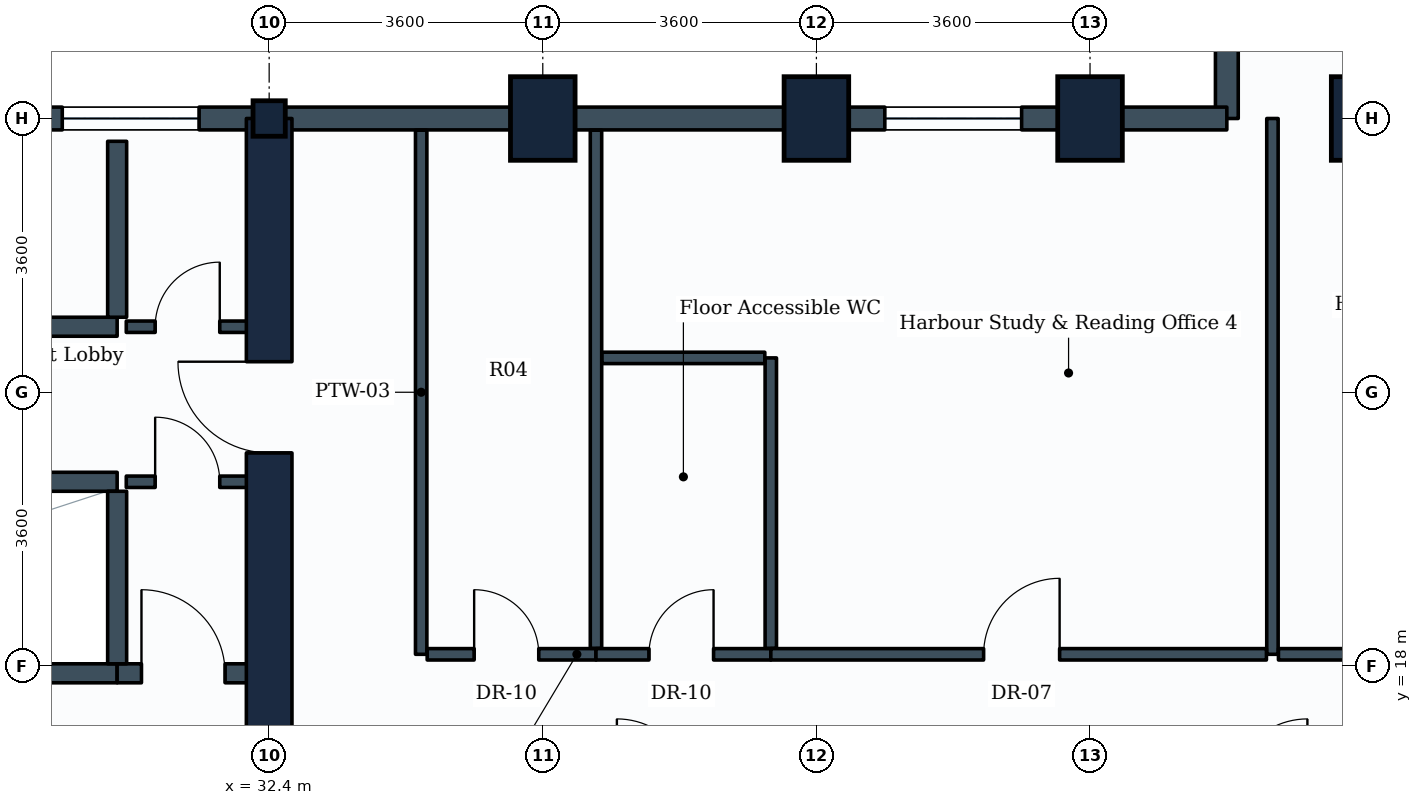
"""IFC4 building model, lengths in metres.
Left out: names, types, materials, properties, quantities, classifications, styles, units other than length and angle.
Written with IfcOpenShell. Run it as: python <this file> out.ifc"""

import sys

from ifc_helpers import new_model, si_unit, direction, frame, frame_2d, origin, origin_2d, place, context, subcontext, project, spatial, rectangle, i_section, extrude, element, fill, save


model = new_model("IFC4")
c1 = context("Model", 3, precision=1e-05, world=origin(), true_north=direction((0.0, 1.0)))
c2 = subcontext(c1, "Body", "Model", "MODEL_VIEW")
j1 = project(units=[si_unit("LENGTHUNIT", "METRE"), si_unit("PLANEANGLEUNIT", "RADIAN")], contexts=[c1])
p1 = place(None, origin())
s1 = spatial("IfcSite", under=j1, at=p1, CompositionType="ELEMENT")
p2 = place(p1, origin())
s2 = spatial("IfcBuilding", under=s1, at=p2, CompositionType="ELEMENT")
p3 = place(p2, frame((0.0, 0.0, 80.1)))
s3 = spatial("IfcBuildingStorey", under=s2, at=p3, CompositionType="ELEMENT", Elevation=80.1)
p4 = place(p3, frame((32.4, 25.2, 0.0), z_axis=(0.0, 0.0, 1.0), x_axis=(1.0, 0.0, 0.0)))
e1 = element("IfcColumn", 1, at=p4, inside=s3, PredefinedType="COLUMN", context=c2, shape_type="SweptSolid", body=[
    extrude(i_section(OverallWidth=0.424, OverallDepth=0.467, WebThickness=0.033, FlangeThickness=0.053, FilletRadius=0.015, at=origin_2d()), origin(), (0.0, 0.0, 1.0), 3.9),
])
for number, where, z_axis, x_axis in (
    (2, (36.0, 25.2, 0.0), (0.0, 0.0, 1.0), (1.0, 0.0, 0.0)),
    (3, (39.6, 25.2, 0.0), (0.0, 0.0, 1.0), (1.0, 0.0, 0.0)),
    (4, (43.2, 25.2, 0.0), (0.0, 0.0, 1.0), (1.0, 0.0, 0.0)),
    (5, (46.8, 25.2, 0.0), (0.0, 0.0, 1.0), (1.0, 0.0, 0.0)),
):
    element("IfcColumn", number, at=place(p3, frame(where, z_axis=z_axis, x_axis=x_axis)), inside=s3, PredefinedType="COLUMN", context=c2, shape_type="SweptSolid", body=[
        extrude(rectangle(XDim=0.85, YDim=1.1, at=origin_2d()), origin(), (0.0, 0.0, 1.0), 3.9),
    ])
p5 = place(p3, frame((45.0, 27.3, 0.0), z_axis=(0.0, 0.0, 1.0), x_axis=(0.0, -1.0, 0.0)))
e6 = element("IfcWall", 6, at=p5, inside=s3, PredefinedType="STANDARD", context=c2, shape_type="SweptSolid", body=[
    extrude(rectangle(XDim=2.1, YDim=0.3, at=frame_2d((1.05, 0.0))), origin(), (0.0, 0.0, 1.0), 2.93),
])
p6 = place(p3, frame((43.2, 25.2, 0.0), z_axis=(0.0, 0.0, 1.0), x_axis=(1.0, 0.0, 0.0)))
e7 = element("IfcWall", 7, at=p6, inside=s3, PredefinedType="STANDARD", context=c2, shape_type="SweptSolid", body=[
    extrude(rectangle(XDim=1.8, YDim=0.3, at=frame_2d((0.9, 0.0))), origin(), (0.0, 0.0, 1.0), 2.93),
])
p7 = place(p3, frame((39.6, 25.2, 0.0), z_axis=(0.0, 0.0, 1.0), x_axis=(1.0, 0.0, 0.0)))
e8 = element("IfcWall", 8, at=p7, inside=s3, PredefinedType="STANDARD", context=c2, shape_type="SweptSolid", body=[
    extrude(rectangle(XDim=3.6, YDim=0.3, at=frame_2d((1.8, 0.0))), origin(), (0.0, 0.0, 1.0), 2.93),
])
p8 = place(p7, frame((0.9, 0.0, 0.85)))
e9 = element("IfcOpeningElement", 9, at=p8, cuts=e8, PredefinedType="OPENING", context=c2, shape_type="SweptSolid", body=[
    extrude(rectangle(XDim=1.8, YDim=1.35, at=frame_2d((0.9, 0.675))), frame((0.0, 0.16, 0.0), z_axis=(0.0, -1.0, 0.0), x_axis=(1.0, 0.0, 0.0)), (0.0, 0.0, 1.0), 0.32),
])
for number, where, z_axis, x_axis in (
    (10, (36.0, 25.2, 0.0), (0.0, 0.0, 1.0), (1.0, 0.0, 0.0)),
    (11, (32.4, 25.2, 0.0), (0.0, 0.0, 1.0), (1.0, 0.0, 0.0)),
):
    element("IfcWall", number, at=place(p3, frame(where, z_axis=z_axis, x_axis=x_axis)), inside=s3, PredefinedType="STANDARD", context=c2, shape_type="SweptSolid", body=[
        extrude(rectangle(XDim=3.6, YDim=0.3, at=frame_2d((1.8, 0.0))), origin(), (0.0, 0.0, 1.0), 2.93),
    ])
p9 = place(p3, frame((28.8, 25.2, 0.0), z_axis=(0.0, 0.0, 1.0), x_axis=(1.0, 0.0, 0.0)))
e12 = element("IfcWall", 12, at=p9, inside=s3, PredefinedType="STANDARD", context=c2, shape_type="SweptSolid", body=[
    extrude(rectangle(XDim=3.6, YDim=0.3, at=frame_2d((1.8, 0.0))), origin(), (0.0, 0.0, 1.0), 3.635),
])
p10 = place(p9, frame((0.878, 0.0, 0.85)))
e13 = element("IfcOpeningElement", 13, at=p10, cuts=e12, PredefinedType="OPENING", context=c2, shape_type="SweptSolid", body=[
    extrude(rectangle(XDim=1.8, YDim=1.35, at=frame_2d((0.9, 0.675))), frame((0.0, 0.16, 0.0), z_axis=(0.0, -1.0, 0.0), x_axis=(1.0, 0.0, 0.0)), (0.0, 0.0, 1.0), 0.32),
])
p11 = place(p3, frame((32.4, 10.8, 0.0), z_axis=(0.0, 0.0, 1.0), x_axis=(0.0, 1.0, 0.0)))
e14 = element("IfcWall", 14, at=p11, inside=s3, PredefinedType="SHEAR", context=c2, shape_type="SweptSolid", body=[
    extrude(rectangle(XDim=14.4, YDim=0.6, at=frame_2d((7.2, 0.0))), origin(), (0.0, 0.0, 1.0), 3.65),
])
p12 = place(p11, frame((4.35, 0.0, 0.0)))
e15 = element("IfcOpeningElement", 15, at=p12, cuts=e14, PredefinedType="OPENING", context=c2, shape_type="SweptSolid", body=[
    extrude(rectangle(XDim=1.2, YDim=2.1, at=frame_2d((0.6, 1.05))), frame((0.0, 0.31, 0.0), z_axis=(0.0, -1.0, 0.0), x_axis=(1.0, 0.0, 0.0)), (0.0, 0.0, 1.0), 0.62),
])
p13 = place(p11, frame((10.0, 0.0, 0.0)))
e16 = element("IfcOpeningElement", 16, at=p13, cuts=e14, PredefinedType="OPENING", context=c2, shape_type="SweptSolid", body=[
    extrude(rectangle(XDim=1.2, YDim=2.1, at=frame_2d((0.6, 1.05))), frame((0.0, 0.31, 0.0), z_axis=(0.0, -1.0, 0.0), x_axis=(1.0, 0.0, 0.0)), (0.0, 0.0, 1.0), 0.62),
])
p14 = place(p3, frame((21.88, 17.9, 0.0), z_axis=(0.0, 0.0, 1.0), x_axis=(1.0, 0.0, 0.0)))
e17 = element("IfcWall", 17, at=p14, inside=s3, PredefinedType="PARTITIONING", context=c2, shape_type="SweptSolid", body=[
    extrude(rectangle(XDim=8.52, YDim=0.25, at=frame_2d((4.26, 0.0))), origin(), (0.0, 0.0, 1.0), 3.635),
])
p15 = place(p3, frame((30.4, 17.9, 0.0), z_axis=(0.0, 0.0, 1.0), x_axis=(1.0, 0.0, 0.0)))
e18 = element("IfcWall", 18, at=p15, inside=s3, PredefinedType="PARTITIONING", context=c2, shape_type="SweptSolid", body=[
    extrude(rectangle(XDim=1.75, YDim=0.25, at=frame_2d((0.875, 0.0))), origin(), (0.0, 0.0, 1.0), 3.635),
])
p16 = place(p15, frame((0.32, 0.0, 0.0)))
e19 = element("IfcOpeningElement", 19, at=p16, cuts=e18, PredefinedType="OPENING", context=c2, shape_type="SweptSolid", body=[
    extrude(rectangle(XDim=1.1, YDim=2.1, at=frame_2d((0.55, 1.05))), frame((0.0, 0.135, 0.0), z_axis=(0.0, -1.0, 0.0), x_axis=(1.0, 0.0, 0.0)), (0.0, 0.0, 1.0), 0.27),
])
p17 = place(p3, frame((23.18, 20.42, 0.0), z_axis=(0.0, 0.0, 1.0), x_axis=(1.0, 0.0, 0.0)))
e20 = element("IfcWall", 20, at=p17, inside=s3, PredefinedType="PARTITIONING", context=c2, shape_type="SweptSolid", body=[
    extrude(rectangle(XDim=7.22, YDim=0.25, at=frame_2d((3.61, 0.0))), origin(), (0.0, 0.0, 1.0), 3.635),
])
p18 = place(p3, frame((30.4, 18.025, 0.0), z_axis=(0.0, 0.0, 1.0), x_axis=(0.0, 1.0, 0.0)))
e21 = element("IfcWall", 21, at=p18, inside=s3, PredefinedType="PARTITIONING", context=c2, shape_type="SweptSolid", body=[
    extrude(rectangle(XDim=2.27, YDim=0.25, at=frame_2d((1.135, 0.0))), origin(), (0.0, 0.0, 1.0), 3.635),
])
p19 = place(p3, frame((23.18, 22.46, 0.0), z_axis=(0.0, 0.0, 1.0), x_axis=(1.0, 0.0, 0.0)))
e22 = element("IfcWall", 22, at=p19, inside=s3, PredefinedType="PARTITIONING", context=c2, shape_type="SweptSolid", body=[
    extrude(rectangle(XDim=7.22, YDim=0.25, at=frame_2d((3.61, 0.0))), origin(), (0.0, 0.0, 1.0), 3.635),
])
p20 = place(p3, frame((30.4, 22.585, 0.0), z_axis=(0.0, 0.0, 1.0), x_axis=(0.0, 1.0, 0.0)))
e23 = element("IfcWall", 23, at=p20, inside=s3, PredefinedType="PARTITIONING", context=c2, shape_type="SweptSolid", body=[
    extrude(rectangle(XDim=2.315, YDim=0.25, at=frame_2d((1.157, 0.0))), origin(), (0.0, 0.0, 1.0), 3.635),
])
p21 = place(p3, frame((30.52, 22.46, 0.0), z_axis=(0.0, 0.0, 1.0), x_axis=(1.0, 0.0, 0.0)))
e24 = element("IfcWall", 24, at=p21, inside=s3, PredefinedType="PARTITIONING", context=c2, shape_type="SweptSolid", body=[
    extrude(rectangle(XDim=1.63, YDim=0.15, at=frame_2d((0.815, 0.0))), origin(), (0.0, 0.0, 1.0), 3.635),
])
p22 = place(p21, frame((0.38, 0.0, 0.0)))
e25 = element("IfcOpeningElement", 25, at=p22, cuts=e24, PredefinedType="OPENING", context=c2, shape_type="SweptSolid", body=[
    extrude(rectangle(XDim=0.85, YDim=2.1, at=frame_2d((0.425, 1.05))), frame((0.0, 0.085, 0.0), z_axis=(0.0, -1.0, 0.0), x_axis=(1.0, 0.0, 0.0)), (0.0, 0.0, 1.0), 0.17),
])
p23 = place(p3, frame((30.52, 20.42, 0.0), z_axis=(0.0, 0.0, 1.0), x_axis=(1.0, 0.0, 0.0)))
e26 = element("IfcWall", 26, at=p23, inside=s3, PredefinedType="PARTITIONING", context=c2, shape_type="SweptSolid", body=[
    extrude(rectangle(XDim=1.63, YDim=0.15, at=frame_2d((0.815, 0.0))), origin(), (0.0, 0.0, 1.0), 3.635),
])
p24 = place(p23, frame((0.38, 0.0, 0.0)))
e27 = element("IfcOpeningElement", 27, at=p24, cuts=e26, PredefinedType="OPENING", context=c2, shape_type="SweptSolid", body=[
    extrude(rectangle(XDim=0.85, YDim=2.1, at=frame_2d((0.425, 1.05))), frame((0.0, 0.085, 0.0), z_axis=(0.0, -1.0, 0.0), x_axis=(1.0, 0.0, 0.0)), (0.0, 0.0, 1.0), 0.17),
])
p25 = place(p3, frame((34.4, 18.15, 0.0), z_axis=(0.0, 0.0, 1.0), x_axis=(0.0, 1.0, 0.0)))
e28 = element("IfcWall", 28, at=p25, inside=s3, PredefinedType="PARTITIONING", context=c2, shape_type="SweptSolid", body=[
    extrude(rectangle(XDim=6.896, YDim=0.15, at=frame_2d((3.448, 0.0))), origin(), (0.0, 0.0, 1.0), 2.93),
])
p26 = place(p3, frame((34.479, 18.15, 0.0), z_axis=(0.0, 0.0, 1.0), x_axis=(1.0, 0.0, 0.0)))
e29 = element("IfcWall", 29, at=p26, inside=s3, PredefinedType="PARTITIONING", context=c2, shape_type="SweptSolid", body=[
    extrude(rectangle(XDim=2.221, YDim=0.15, at=frame_2d((1.11, 0.0))), origin(), (0.0, 0.0, 1.0), 3.18),
])
p27 = place(p26, frame((0.618, 0.0, 0.0)))
e30 = element("IfcOpeningElement", 30, at=p27, cuts=e29, PredefinedType="OPENING", context=c2, shape_type="SweptSolid", body=[
    extrude(rectangle(XDim=0.85, YDim=2.1, at=frame_2d((0.425, 1.05))), frame((0.0, 0.085, 0.0), z_axis=(0.0, -1.0, 0.0), x_axis=(1.0, 0.0, 0.0)), (0.0, 0.0, 1.0), 0.17),
])
p28 = place(p3, frame((36.7, 18.229, 0.0), z_axis=(0.0, 0.0, 1.0), x_axis=(0.0, 1.0, 0.0)))
e31 = element("IfcWall", 31, at=p28, inside=s3, PredefinedType="PARTITIONING", context=c2, shape_type="SweptSolid", body=[
    extrude(rectangle(XDim=6.817, YDim=0.15, at=frame_2d((3.408, 0.0))), origin(), (0.0, 0.0, 1.0), 2.93),
])
p29 = place(p3, frame((36.7, 18.15, 0.0), z_axis=(0.0, 0.0, 1.0), x_axis=(1.0, 0.0, 0.0)))
e32 = element("IfcWall", 32, at=p29, inside=s3, PredefinedType="PARTITIONING", context=c2, shape_type="SweptSolid", body=[
    extrude(rectangle(XDim=2.3, YDim=0.15, at=frame_2d((1.15, 0.0))), origin(), (0.0, 0.0, 1.0), 3.27),
])
p30 = place(p29, frame((0.697, 0.0, 0.0)))
e33 = element("IfcOpeningElement", 33, at=p30, cuts=e32, PredefinedType="OPENING", context=c2, shape_type="SweptSolid", body=[
    extrude(rectangle(XDim=0.85, YDim=2.1, at=frame_2d((0.425, 1.05))), frame((0.0, 0.085, 0.0), z_axis=(0.0, -1.0, 0.0), x_axis=(1.0, 0.0, 0.0)), (0.0, 0.0, 1.0), 0.17),
])
p31 = place(p3, frame((39.0, 18.229, 0.0), z_axis=(0.0, 0.0, 1.0), x_axis=(0.0, 1.0, 0.0)))
e34 = element("IfcWall", 34, at=p31, inside=s3, PredefinedType="PARTITIONING", context=c2, shape_type="SweptSolid", body=[
    extrude(rectangle(XDim=3.821, YDim=0.15, at=frame_2d((1.911, 0.0))), origin(), (0.0, 0.0, 1.0), 3.18),
])
p32 = place(p3, frame((36.779, 22.05, 0.0), z_axis=(0.0, 0.0, 1.0), x_axis=(1.0, 0.0, 0.0)))
e35 = element("IfcWall", 35, at=p32, inside=s3, PredefinedType="PARTITIONING", context=c2, shape_type="SweptSolid", body=[
    extrude(rectangle(XDim=2.142, YDim=0.15, at=frame_2d((1.071, 0.0))), origin(), (0.0, 0.0, 1.0), 3.635),
])
p33 = place(p3, frame((45.6, 18.15, 0.0), z_axis=(0.0, 0.0, 1.0), x_axis=(0.0, 1.0, 0.0)))
e36 = element("IfcWall", 36, at=p33, inside=s3, PredefinedType="PARTITIONING", context=c2, shape_type="SweptSolid", body=[
    extrude(rectangle(XDim=7.05, YDim=0.15, at=frame_2d((3.525, 0.0))), origin(), (0.0, 0.0, 1.0), 2.93),
])
p34 = place(p3, frame((39.0, 18.15, 0.0), z_axis=(0.0, 0.0, 1.0), x_axis=(1.0, 0.0, 0.0)))
e37 = element("IfcWall", 37, at=p34, inside=s3, PredefinedType="PARTITIONING", context=c2, shape_type="SweptSolid", body=[
    extrude(rectangle(XDim=6.521, YDim=0.15, at=frame_2d((3.26, 0.0))), origin(), (0.0, 0.0, 1.0), 3.18),
])
p35 = place(p34, frame((2.8, 0.0, 0.0)))
e38 = element("IfcOpeningElement", 38, at=p35, cuts=e37, PredefinedType="OPENING", context=c2, shape_type="SweptSolid", body=[
    extrude(rectangle(XDim=1.0, YDim=2.1, at=frame_2d((0.5, 1.05))), frame((0.0, 0.085, 0.0), z_axis=(0.0, -1.0, 0.0), x_axis=(1.0, 0.0, 0.0)), (0.0, 0.0, 1.0), 0.17),
])
p36 = place(p3, frame((45.679, 18.15, 0.0), z_axis=(0.0, 0.0, 1.0), x_axis=(1.0, 0.0, 0.0)))
e39 = element("IfcWall", 39, at=p36, inside=s3, PredefinedType="PARTITIONING", context=c2, shape_type="SweptSolid", body=[
    extrude(rectangle(XDim=6.521, YDim=0.15, at=frame_2d((3.26, 0.0))), origin(), (0.0, 0.0, 1.0), 3.19),
])
p37 = place(p36, frame((2.721, 0.0, 0.0)))
e40 = element("IfcOpeningElement", 40, at=p37, cuts=e39, PredefinedType="OPENING", context=c2, shape_type="SweptSolid", body=[
    extrude(rectangle(XDim=1.0, YDim=2.1, at=frame_2d((0.5, 1.05))), frame((0.0, 0.085, 0.0), z_axis=(0.0, -1.0, 0.0), x_axis=(1.0, 0.0, 0.0)), (0.0, 0.0, 1.0), 0.17),
])
p38 = place(p8, origin())
e41 = element("IfcWindow", 41, at=p38, inside=s3, PartitioningType="SINGLE_PANEL", PredefinedType="WINDOW", context=c2, shape_type="SweptSolid", body=[
    extrude(rectangle(XDim=1.8, YDim=1.35, at=frame_2d((0.9, 0.675))), frame((0.0, 0.03, 0.0), z_axis=(0.0, -1.0, 0.0), x_axis=(1.0, 0.0, 0.0)), (0.0, 0.0, 1.0), 0.06),
])
fill(e9, e41)
p39 = place(p10, origin())
e42 = element("IfcWindow", 42, at=p39, inside=s3, PartitioningType="SINGLE_PANEL", PredefinedType="WINDOW", context=c2, shape_type="SweptSolid", body=[
    extrude(rectangle(XDim=1.8, YDim=1.35, at=frame_2d((0.9, 0.675))), frame((0.0, 0.03, 0.0), z_axis=(0.0, -1.0, 0.0), x_axis=(1.0, 0.0, 0.0)), (0.0, 0.0, 1.0), 0.06),
])
fill(e13, e42)
p40 = place(p16, origin())
e43 = element("IfcDoor", 43, at=p40, inside=s3, OperationType="SINGLE_SWING_LEFT", PredefinedType="DOOR", context=c2, shape_type="SweptSolid", body=[
    extrude(rectangle(XDim=1.1, YDim=2.1, at=frame_2d((0.55, 1.05))), frame((0.0, 0.025, 0.0), z_axis=(0.0, -1.0, 0.0), x_axis=(1.0, 0.0, 0.0)), (0.0, 0.0, 1.0), 0.05),
])
fill(e19, e43)
p41 = place(p13, origin())
e44 = element("IfcDoor", 44, at=p41, inside=s3, OperationType="SINGLE_SWING_RIGHT", PredefinedType="DOOR", context=c2, shape_type="SweptSolid", body=[
    extrude(rectangle(XDim=1.2, YDim=2.1, at=frame_2d((0.6, 1.05))), frame((0.0, 0.025, 0.0), z_axis=(0.0, -1.0, 0.0), x_axis=(1.0, 0.0, 0.0)), (0.0, 0.0, 1.0), 0.05),
])
fill(e16, e44)
p42 = place(p22, origin())
e45 = element("IfcDoor", 45, at=p42, inside=s3, OperationType="SINGLE_SWING_RIGHT", PredefinedType="DOOR", context=c2, shape_type="SweptSolid", body=[
    extrude(rectangle(XDim=0.85, YDim=2.1, at=frame_2d((0.425, 1.05))), frame((0.0, 0.025, 0.0), z_axis=(0.0, -1.0, 0.0), x_axis=(1.0, 0.0, 0.0)), (0.0, 0.0, 1.0), 0.05),
])
fill(e25, e45)
p43 = place(p24, origin())
e46 = element("IfcDoor", 46, at=p43, inside=s3, OperationType="SINGLE_SWING_LEFT", PredefinedType="DOOR", context=c2, shape_type="SweptSolid", body=[
    extrude(rectangle(XDim=0.85, YDim=2.1, at=frame_2d((0.425, 1.05))), frame((0.0, 0.025, 0.0), z_axis=(0.0, -1.0, 0.0), x_axis=(1.0, 0.0, 0.0)), (0.0, 0.0, 1.0), 0.05),
])
fill(e27, e46)
p44 = place(p27, origin())
e47 = element("IfcDoor", 47, at=p44, inside=s3, OperationType="SINGLE_SWING_LEFT", PredefinedType="DOOR", context=c2, shape_type="SweptSolid", body=[
    extrude(rectangle(XDim=0.85, YDim=2.1, at=frame_2d((0.425, 1.05))), frame((0.0, 0.025, 0.0), z_axis=(0.0, -1.0, 0.0), x_axis=(1.0, 0.0, 0.0)), (0.0, 0.0, 1.0), 0.05),
])
fill(e30, e47)
p45 = place(p30, origin())
e48 = element("IfcDoor", 48, at=p45, inside=s3, OperationType="SINGLE_SWING_RIGHT", PredefinedType="DOOR", context=c2, shape_type="SweptSolid", body=[
    extrude(rectangle(XDim=0.85, YDim=2.1, at=frame_2d((0.425, 1.05))), frame((0.0, 0.025, 0.0), z_axis=(0.0, -1.0, 0.0), x_axis=(1.0, 0.0, 0.0)), (0.0, 0.0, 1.0), 0.05),
])
fill(e33, e48)
p46 = place(p35, origin())
e49 = element("IfcDoor", 49, at=p46, inside=s3, OperationType="SINGLE_SWING_RIGHT", PredefinedType="DOOR", context=c2, shape_type="SweptSolid", body=[
    extrude(rectangle(XDim=1.0, YDim=2.1, at=frame_2d((0.5, 1.05))), frame((0.0, 0.025, 0.0), z_axis=(0.0, -1.0, 0.0), x_axis=(1.0, 0.0, 0.0)), (0.0, 0.0, 1.0), 0.05),
])
fill(e38, e49)
save(model, sys.argv[1])
